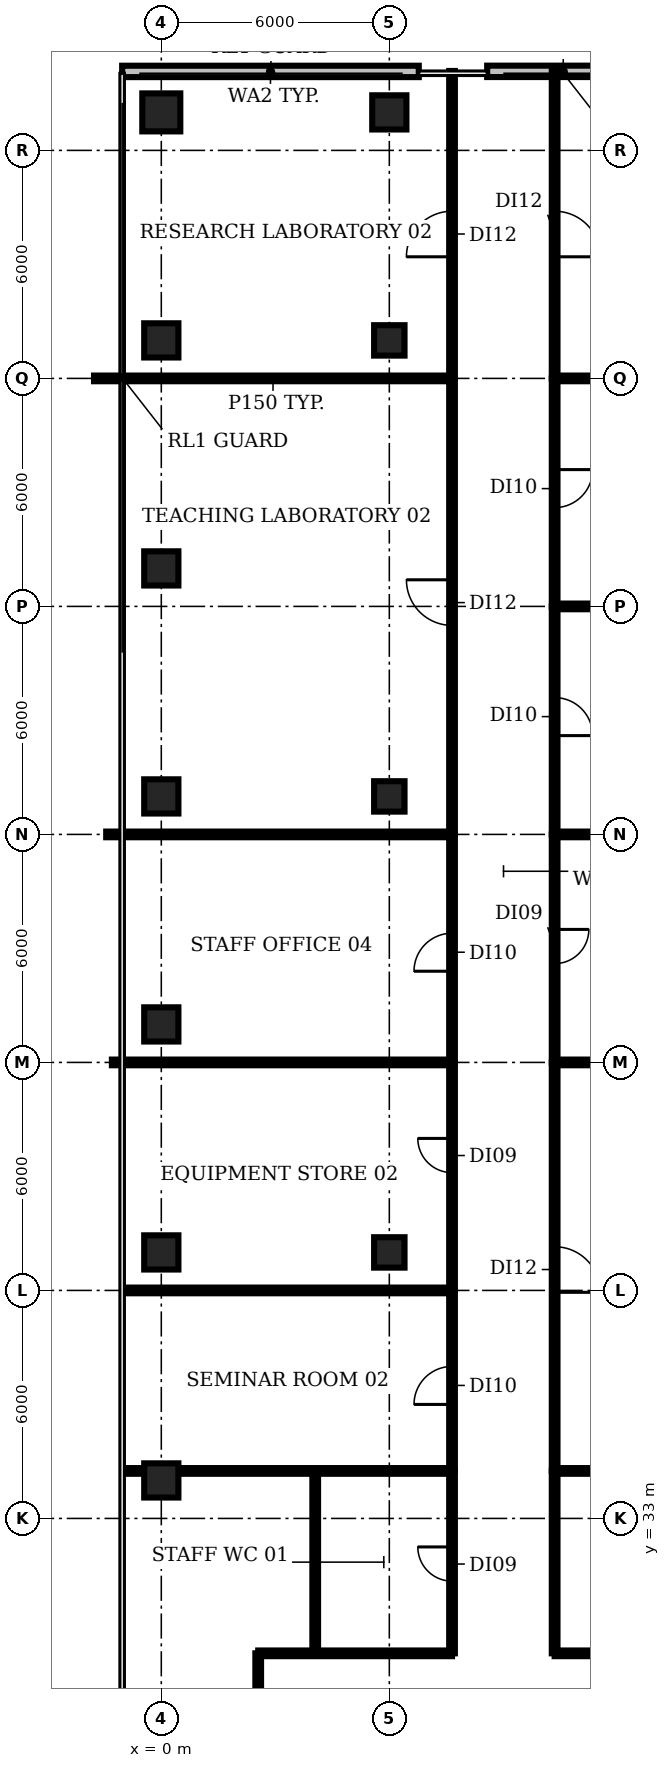
"""IFC4 building model, lengths in metres.
Left out: names, types, materials, properties, quantities, classifications, styles, units other than length and angle.
Written with IfcOpenShell. Run it as: python <this file> out.ifc"""

import sys

from ifc_helpers import new_model, si_unit, direction, frame, frame_2d, origin, origin_2d, place, context, subcontext, project, spatial, rectangle, circle, extrude, element, fill, save


model = new_model("IFC4")
c1 = context("Model", 3, precision=1e-05, world=origin(), true_north=direction((0.0, 1.0)))
c2 = subcontext(c1, "Body", "Model", "MODEL_VIEW")
j1 = project(units=[si_unit("LENGTHUNIT", "METRE"), si_unit("PLANEANGLEUNIT", "RADIAN")], contexts=[c1])
p1 = place(None, origin())
s1 = spatial("IfcSite", under=j1, at=p1, CompositionType="ELEMENT")
p2 = place(p1, origin())
s2 = spatial("IfcBuilding", under=s1, at=p2, CompositionType="ELEMENT")
p3 = place(p2, frame((0.0, 0.0, 104.6)))
s3 = spatial("IfcBuildingStorey", under=s2, at=p3, CompositionType="ELEMENT", Elevation=104.6)
for number, where, z_axis, x_axis in (
    (1, (0.0, 34.0, 0.0), (0.0, 0.0, 1.0), (1.0, 0.0, 0.0)),
    (2, (0.0, 40.0, 0.0), (0.0, 0.0, 1.0), (1.0, 0.0, 0.0)),
    (3, (0.0, 46.0, 0.0), (0.0, 0.0, 1.0), (1.0, 0.0, 0.0)),
    (4, (0.0, 52.0, 0.0), (0.0, 0.0, 1.0), (1.0, 0.0, 0.0)),
    (5, (0.0, 58.0, 0.0), (0.0, 0.0, 1.0), (1.0, 0.0, 0.0)),
    (6, (0.0, 64.0, 0.0), (0.0, 0.0, 1.0), (1.0, 0.0, 0.0)),
):
    element("IfcColumn", number, at=place(p3, frame(where, z_axis=z_axis, x_axis=x_axis)), inside=s3, PredefinedType="COLUMN", context=c2, shape_type="SweptSolid", body=[
        extrude(rectangle(XDim=0.9, YDim=0.9, at=origin_2d()), origin(), (0.0, 0.0, 1.0), 3.85),
    ])
p4 = place(p3, frame((0.0, 70.0, 0.0), z_axis=(0.0, 0.0, 1.0), x_axis=(1.0, 0.0, 0.0)))
e7 = element("IfcColumn", 7, at=p4, inside=s3, PredefinedType="COLUMN", context=c2, shape_type="SweptSolid", body=[
    extrude(circle(Radius=0.5, at=origin_2d()), origin(), (0.0, 0.0, 1.0), 3.85),
])
for number, where, z_axis, x_axis in (
    (8, (6.0, 40.0, 0.0), (0.0, 0.0, 1.0), (1.0, 0.0, 0.0)),
    (9, (6.0, 52.0, 0.0), (0.0, 0.0, 1.0), (1.0, 0.0, 0.0)),
    (10, (6.0, 64.0, 0.0), (0.0, 0.0, 1.0), (1.0, 0.0, 0.0)),
):
    element("IfcColumn", number, at=place(p3, frame(where, z_axis=z_axis, x_axis=x_axis)), inside=s3, PredefinedType="COLUMN", context=c2, shape_type="SweptSolid", body=[
        extrude(rectangle(XDim=0.8, YDim=0.8, at=origin_2d()), origin(), (0.0, 0.0, 1.0), 3.85),
    ])
p5 = place(p3, frame((6.0, 70.0, 0.0), z_axis=(0.0, 0.0, 1.0), x_axis=(1.0, 0.0, 0.0)))
e11 = element("IfcColumn", 11, at=p5, inside=s3, PredefinedType="COLUMN", context=c2, shape_type="SweptSolid", body=[
    extrude(rectangle(XDim=0.9, YDim=0.9, at=origin_2d()), origin(), (0.0, 0.0, 1.0), 3.85),
])
p6 = place(p3, frame((12.578, 71.08, 0.0), z_axis=(0.0, 0.0, 1.0), x_axis=(-1.0, 0.0, 0.0)))
e12 = element("IfcWall", 12, at=p6, inside=s3, PredefinedType="SOLIDWALL", context=c2, shape_type="SweptSolid", body=[
    extrude(rectangle(XDim=4.003, YDim=0.3, at=frame_2d((2.002, 0.0))), origin(), (0.0, 0.0, 1.0), 3.85),
])
p7 = place(p3, frame((6.775, 71.078, 0.0), z_axis=(0.0, 0.0, 1.0), x_axis=(-1.0, 0.0, 0.0)))
e13 = element("IfcWall", 13, at=p7, inside=s3, PredefinedType="SOLIDWALL", context=c2, shape_type="SweptSolid", body=[
    extrude(rectangle(XDim=7.805, YDim=0.3, at=frame_2d((3.902, 0.0))), origin(), (0.0, 0.0, 1.0), 3.85),
])
p8 = place(p3, frame((-1.77, 63.0, 0.0), z_axis=(0.0, 0.0, 1.0), x_axis=(1.0, 0.0, 0.0)))
e14 = element("IfcWall", 14, at=p8, inside=s3, PredefinedType="PARTITIONING", context=c2, shape_type="SweptSolid", body=[
    extrude(rectangle(XDim=9.42, YDim=0.15, at=frame_2d((4.71, 0.0))), origin(), (0.0, 0.0, 1.0), 2.83),
])
p9 = place(p3, frame((-1.45, 51.0, 0.0), z_axis=(0.0, 0.0, 1.0), x_axis=(1.0, 0.0, 0.0)))
e15 = element("IfcWall", 15, at=p9, inside=s3, PredefinedType="PARTITIONING", context=c2, shape_type="SweptSolid", body=[
    extrude(rectangle(XDim=9.1, YDim=0.15, at=frame_2d((4.55, 0.0))), origin(), (0.0, 0.0, 1.0), 2.83),
])
p10 = place(p3, frame((-1.3, 45.0, 0.0), z_axis=(0.0, 0.0, 1.0), x_axis=(1.0, 0.0, 0.0)))
e16 = element("IfcWall", 16, at=p10, inside=s3, PredefinedType="PARTITIONING", context=c2, shape_type="SweptSolid", body=[
    extrude(rectangle(XDim=8.95, YDim=0.15, at=frame_2d((4.475, 0.0))), origin(), (0.0, 0.0, 1.0), 2.83),
])
p11 = place(p3, frame((-0.965, 34.25, 0.0), z_axis=(0.0, 0.0, 1.0), x_axis=(1.0, 0.0, 0.0)))
e17 = element("IfcWall", 17, at=p11, inside=s3, PredefinedType="PARTITIONING", context=c2, shape_type="SweptSolid", body=[
    extrude(rectangle(XDim=8.615, YDim=0.15, at=frame_2d((4.308, 0.0))), origin(), (0.0, 0.0, 1.0), 2.83),
])
p12 = place(p3, frame((-0.97, 39.0, 0.0), z_axis=(0.0, 0.0, 1.0), x_axis=(1.0, 0.0, 0.0)))
e18 = element("IfcWall", 18, at=p12, inside=s3, PredefinedType="PARTITIONING", context=c2, shape_type="SweptSolid", body=[
    extrude(rectangle(XDim=8.62, YDim=0.15, at=frame_2d((4.31, 0.0))), origin(), (0.0, 0.0, 1.0), 2.83),
])
p13 = place(p3, frame((2.55, 25.55, 0.0), z_axis=(0.0, 0.0, 1.0), x_axis=(0.0, 1.0, 0.0)))
e19 = element("IfcWall", 19, at=p13, inside=s3, PredefinedType="PARTITIONING", context=c2, shape_type="SweptSolid", body=[
    extrude(rectangle(XDim=3.9, YDim=0.15, at=frame_2d((1.95, 0.0))), origin(), (0.0, 0.0, 1.0), 2.83),
])
p14 = place(p3, frame((2.55, 29.45, 0.0), z_axis=(0.0, 0.0, 1.0), x_axis=(1.0, 0.0, 0.0)))
e20 = element("IfcWall", 20, at=p14, inside=s3, PredefinedType="PARTITIONING", context=c2, shape_type="SweptSolid", body=[
    extrude(rectangle(XDim=5.1, YDim=0.15, at=frame_2d((2.55, 0.0))), origin(), (0.0, 0.0, 1.0), 2.83),
])
p15 = place(p3, frame((4.05, 29.45, 0.0), z_axis=(0.0, 0.0, 1.0), x_axis=(0.0, 1.0, 0.0)))
e21 = element("IfcWall", 21, at=p15, inside=s3, PredefinedType="PARTITIONING", context=c2, shape_type="SweptSolid", body=[
    extrude(rectangle(XDim=4.8, YDim=0.15, at=frame_2d((2.4, 0.0))), origin(), (0.0, 0.0, 1.0), 2.83),
])
p16 = place(p3, frame((7.65, 29.45, 0.0), z_axis=(0.0, 0.0, 1.0), x_axis=(0.0, 1.0, 0.0)))
e22 = element("IfcWall", 22, at=p16, inside=s3, PredefinedType="PARTITIONING", context=c2, shape_type="SweptSolid", body=[
    extrude(rectangle(XDim=4.8, YDim=0.15, at=frame_2d((2.4, 0.0))), origin(), (0.0, 0.0, 1.0), 2.83),
])
p17 = place(p16, frame((1.9, 0.0, 0.0)))
e23 = element("IfcOpeningElement", 23, at=p17, cuts=e22, PredefinedType="OPENING", context=c2, shape_type="SweptSolid", body=[
    extrude(rectangle(XDim=0.9, YDim=2.1, at=frame_2d((0.45, 1.05))), frame((0.0, 0.085, 0.0), z_axis=(0.0, -1.0, 0.0), x_axis=(1.0, 0.0, 0.0)), (0.0, 0.0, 1.0), 0.17),
])
p18 = place(p3, frame((7.65, 34.25, 0.0), z_axis=(0.0, 0.0, 1.0), x_axis=(0.0, 1.0, 0.0)))
e24 = element("IfcWall", 24, at=p18, inside=s3, PredefinedType="PARTITIONING", context=c2, shape_type="SweptSolid", body=[
    extrude(rectangle(XDim=4.75, YDim=0.15, at=frame_2d((2.375, 0.0))), origin(), (0.0, 0.0, 1.0), 2.83),
])
p19 = place(p18, frame((1.75, 0.0, 0.0)))
e25 = element("IfcOpeningElement", 25, at=p19, cuts=e24, PredefinedType="OPENING", context=c2, shape_type="SweptSolid", body=[
    extrude(rectangle(XDim=1.0, YDim=2.1, at=frame_2d((0.5, 1.05))), frame((0.0, 0.085, 0.0), z_axis=(0.0, -1.0, 0.0), x_axis=(1.0, 0.0, 0.0)), (0.0, 0.0, 1.0), 0.17),
])
p20 = place(p3, frame((7.65, 39.0, 0.0), z_axis=(0.0, 0.0, 1.0), x_axis=(0.0, 1.0, 0.0)))
e26 = element("IfcWall", 26, at=p20, inside=s3, PredefinedType="PARTITIONING", context=c2, shape_type="SweptSolid", body=[
    extrude(rectangle(XDim=6.0, YDim=0.15, at=frame_2d((3.0, 0.0))), origin(), (0.0, 0.0, 1.0), 2.83),
])
p21 = place(p20, frame((3.1, 0.0, 0.0)))
e27 = element("IfcOpeningElement", 27, at=p21, cuts=e26, PredefinedType="OPENING", context=c2, shape_type="SweptSolid", body=[
    extrude(rectangle(XDim=0.9, YDim=2.1, at=frame_2d((0.45, 1.05))), frame((0.0, 0.085, 0.0), z_axis=(0.0, -1.0, 0.0), x_axis=(1.0, 0.0, 0.0)), (0.0, 0.0, 1.0), 0.17),
])
p22 = place(p3, frame((7.65, 45.0, 0.0), z_axis=(0.0, 0.0, 1.0), x_axis=(0.0, 1.0, 0.0)))
e28 = element("IfcWall", 28, at=p22, inside=s3, PredefinedType="PARTITIONING", context=c2, shape_type="SweptSolid", body=[
    extrude(rectangle(XDim=6.0, YDim=0.15, at=frame_2d((3.0, 0.0))), origin(), (0.0, 0.0, 1.0), 2.83),
])
p23 = place(p22, frame((2.4, 0.0, 0.0)))
e29 = element("IfcOpeningElement", 29, at=p23, cuts=e28, PredefinedType="OPENING", context=c2, shape_type="SweptSolid", body=[
    extrude(rectangle(XDim=1.0, YDim=2.1, at=frame_2d((0.5, 1.05))), frame((0.0, 0.085, 0.0), z_axis=(0.0, -1.0, 0.0), x_axis=(1.0, 0.0, 0.0)), (0.0, 0.0, 1.0), 0.17),
])
p24 = place(p3, frame((7.65, 51.0, 0.0), z_axis=(0.0, 0.0, 1.0), x_axis=(0.0, 1.0, 0.0)))
e30 = element("IfcWall", 30, at=p24, inside=s3, PredefinedType="PARTITIONING", context=c2, shape_type="SweptSolid", body=[
    extrude(rectangle(XDim=12.0, YDim=0.15, at=frame_2d((6.0, 0.0))), origin(), (0.0, 0.0, 1.0), 2.83),
])
p25 = place(p24, frame((5.5, 0.0, 0.0)))
e31 = element("IfcOpeningElement", 31, at=p25, cuts=e30, PredefinedType="OPENING", context=c2, shape_type="SweptSolid", body=[
    extrude(rectangle(XDim=1.2, YDim=2.1, at=frame_2d((0.6, 1.05))), frame((0.0, 0.085, 0.0), z_axis=(0.0, -1.0, 0.0), x_axis=(1.0, 0.0, 0.0)), (0.0, 0.0, 1.0), 0.17),
])
p26 = place(p3, frame((7.65, 63.0, 0.0), z_axis=(0.0, 0.0, 1.0), x_axis=(0.0, 1.0, 0.0)))
e32 = element("IfcWall", 32, at=p26, inside=s3, PredefinedType="PARTITIONING", context=c2, shape_type="SweptSolid", body=[
    extrude(rectangle(XDim=8.09, YDim=0.15, at=frame_2d((4.045, 0.0))), origin(), (0.0, 0.0, 1.0), 2.83),
])
p27 = place(p26, frame((3.2, 0.0, 0.0)))
e33 = element("IfcOpeningElement", 33, at=p27, cuts=e32, PredefinedType="OPENING", context=c2, shape_type="SweptSolid", body=[
    extrude(rectangle(XDim=1.2, YDim=2.1, at=frame_2d((0.6, 1.05))), frame((0.0, 0.085, 0.0), z_axis=(0.0, -1.0, 0.0), x_axis=(1.0, 0.0, 0.0)), (0.0, 0.0, 1.0), 0.17),
])
p28 = place(p3, frame((10.35, 29.45, 0.0), z_axis=(0.0, 0.0, 1.0), x_axis=(0.0, 1.0, 0.0)))
e34 = element("IfcWall", 34, at=p28, inside=s3, PredefinedType="PARTITIONING", context=c2, shape_type="SweptSolid", body=[
    extrude(rectangle(XDim=4.8, YDim=0.15, at=frame_2d((2.4, 0.0))), origin(), (0.0, 0.0, 1.0), 2.83),
])
p29 = place(p3, frame((10.35, 29.45, 0.0), z_axis=(0.0, 0.0, 1.0), x_axis=(1.0, 0.0, 0.0)))
e35 = element("IfcWall", 35, at=p29, inside=s3, PredefinedType="PARTITIONING", context=c2, shape_type="SweptSolid", body=[
    extrude(rectangle(XDim=4.05, YDim=0.15, at=frame_2d((2.025, 0.0))), origin(), (0.0, 0.0, 1.0), 2.83),
])
p30 = place(p3, frame((10.35, 34.25, 0.0), z_axis=(0.0, 0.0, 1.0), x_axis=(1.0, 0.0, 0.0)))
e36 = element("IfcWall", 36, at=p30, inside=s3, PredefinedType="PARTITIONING", context=c2, shape_type="SweptSolid", body=[
    extrude(rectangle(XDim=14.82, YDim=0.15, at=frame_2d((7.41, 0.0))), origin(), (0.0, 0.0, 1.0), 2.83),
])
p31 = place(p3, frame((10.35, 45.0, 0.0), z_axis=(0.0, 0.0, 1.0), x_axis=(0.0, -1.0, 0.0)))
e37 = element("IfcWall", 37, at=p31, inside=s3, PredefinedType="PARTITIONING", context=c2, shape_type="SweptSolid", body=[
    extrude(rectangle(XDim=10.75, YDim=0.15, at=frame_2d((5.375, 0.0))), origin(), (0.0, 0.0, 1.0), 2.83),
])
p32 = place(p31, frame((4.85, 0.0, 0.0)))
e38 = element("IfcOpeningElement", 38, at=p32, cuts=e37, PredefinedType="OPENING", context=c2, shape_type="SweptSolid", body=[
    extrude(rectangle(XDim=1.2, YDim=2.1, at=frame_2d((0.6, 1.05))), frame((0.0, 0.085, 0.0), z_axis=(0.0, -1.0, 0.0), x_axis=(1.0, 0.0, 0.0)), (0.0, 0.0, 1.0), 0.17),
])
p33 = place(p3, frame((10.35, 45.0, 0.0), z_axis=(0.0, 0.0, 1.0), x_axis=(1.0, 0.0, 0.0)))
e39 = element("IfcWall", 39, at=p33, inside=s3, PredefinedType="PARTITIONING", context=c2, shape_type="SweptSolid", body=[
    extrude(rectangle(XDim=14.63, YDim=0.15, at=frame_2d((7.315, 0.0))), origin(), (0.0, 0.0, 1.0), 2.83),
])
p34 = place(p3, frame((10.35, 51.0, 0.0), z_axis=(0.0, 0.0, 1.0), x_axis=(0.0, -1.0, 0.0)))
e40 = element("IfcWall", 40, at=p34, inside=s3, PredefinedType="PARTITIONING", context=c2, shape_type="SweptSolid", body=[
    extrude(rectangle(XDim=6.0, YDim=0.15, at=frame_2d((3.0, 0.0))), origin(), (0.0, 0.0, 1.0), 2.83),
])
p35 = place(p34, frame((2.5, 0.0, 0.0)))
e41 = element("IfcOpeningElement", 41, at=p35, cuts=e40, PredefinedType="OPENING", context=c2, shape_type="SweptSolid", body=[
    extrude(rectangle(XDim=0.9, YDim=2.1, at=frame_2d((0.45, 1.05))), frame((0.0, 0.085, 0.0), z_axis=(0.0, -1.0, 0.0), x_axis=(1.0, 0.0, 0.0)), (0.0, 0.0, 1.0), 0.17),
])
p36 = place(p3, frame((10.35, 51.0, 0.0), z_axis=(0.0, 0.0, 1.0), x_axis=(1.0, 0.0, 0.0)))
e42 = element("IfcWall", 42, at=p36, inside=s3, PredefinedType="PARTITIONING", context=c2, shape_type="SweptSolid", body=[
    extrude(rectangle(XDim=14.63, YDim=0.15, at=frame_2d((7.315, 0.0))), origin(), (0.0, 0.0, 1.0), 2.83),
])
p37 = place(p3, frame((10.35, 57.0, 0.0), z_axis=(0.0, 0.0, 1.0), x_axis=(0.0, -1.0, 0.0)))
e43 = element("IfcWall", 43, at=p37, inside=s3, PredefinedType="PARTITIONING", context=c2, shape_type="SweptSolid", body=[
    extrude(rectangle(XDim=6.0, YDim=0.15, at=frame_2d((3.0, 0.0))), origin(), (0.0, 0.0, 1.0), 2.83),
])
p38 = place(p37, frame((2.4, 0.0, 0.0)))
e44 = element("IfcOpeningElement", 44, at=p38, cuts=e43, PredefinedType="OPENING", context=c2, shape_type="SweptSolid", body=[
    extrude(rectangle(XDim=1.0, YDim=2.1, at=frame_2d((0.5, 1.05))), frame((0.0, 0.085, 0.0), z_axis=(0.0, -1.0, 0.0), x_axis=(1.0, 0.0, 0.0)), (0.0, 0.0, 1.0), 0.17),
])
p39 = place(p3, frame((10.35, 57.0, 0.0), z_axis=(0.0, 0.0, 1.0), x_axis=(1.0, 0.0, 0.0)))
e45 = element("IfcWall", 45, at=p39, inside=s3, PredefinedType="PARTITIONING", context=c2, shape_type="SweptSolid", body=[
    extrude(rectangle(XDim=14.63, YDim=0.15, at=frame_2d((7.315, 0.0))), origin(), (0.0, 0.0, 1.0), 2.83),
])
p40 = place(p3, frame((10.35, 63.0, 0.0), z_axis=(0.0, 0.0, 1.0), x_axis=(0.0, -1.0, 0.0)))
e46 = element("IfcWall", 46, at=p40, inside=s3, PredefinedType="PARTITIONING", context=c2, shape_type="SweptSolid", body=[
    extrude(rectangle(XDim=6.0, YDim=0.15, at=frame_2d((3.0, 0.0))), origin(), (0.0, 0.0, 1.0), 2.83),
])
p41 = place(p40, frame((2.4, 0.0, 0.0)))
e47 = element("IfcOpeningElement", 47, at=p41, cuts=e46, PredefinedType="OPENING", context=c2, shape_type="SweptSolid", body=[
    extrude(rectangle(XDim=1.0, YDim=2.1, at=frame_2d((0.5, 1.05))), frame((0.0, 0.085, 0.0), z_axis=(0.0, -1.0, 0.0), x_axis=(1.0, 0.0, 0.0)), (0.0, 0.0, 1.0), 0.17),
])
p42 = place(p3, frame((10.35, 63.0, 0.0), z_axis=(0.0, 0.0, 1.0), x_axis=(1.0, 0.0, 0.0)))
e48 = element("IfcWall", 48, at=p42, inside=s3, PredefinedType="PARTITIONING", context=c2, shape_type="SweptSolid", body=[
    extrude(rectangle(XDim=14.63, YDim=0.15, at=frame_2d((7.315, 0.0))), origin(), (0.0, 0.0, 1.0), 2.83),
])
p43 = place(p3, frame((10.35, 71.09, 0.0), z_axis=(0.0, 0.0, 1.0), x_axis=(0.0, -1.0, 0.0)))
e49 = element("IfcWall", 49, at=p43, inside=s3, PredefinedType="PARTITIONING", context=c2, shape_type="SweptSolid", body=[
    extrude(rectangle(XDim=8.09, YDim=0.15, at=frame_2d((4.045, 0.0))), origin(), (0.0, 0.0, 1.0), 2.83),
])
p44 = place(p43, frame((3.69, 0.0, 0.0)))
e50 = element("IfcOpeningElement", 50, at=p44, cuts=e49, PredefinedType="OPENING", context=c2, shape_type="SweptSolid", body=[
    extrude(rectangle(XDim=1.2, YDim=2.1, at=frame_2d((0.6, 1.05))), frame((0.0, 0.085, 0.0), z_axis=(0.0, -1.0, 0.0), x_axis=(1.0, 0.0, 0.0)), (0.0, 0.0, 1.0), 0.17),
])
p45 = place(p17, origin())
e51 = element("IfcDoor", 51, at=p45, inside=s3, OperationType="SINGLE_SWING_RIGHT", PredefinedType="DOOR", context=c2, shape_type="SweptSolid", body=[
    extrude(rectangle(XDim=0.9, YDim=2.1, at=frame_2d((0.45, 1.05))), frame((0.0, 0.025, 0.0), z_axis=(0.0, -1.0, 0.0), x_axis=(1.0, 0.0, 0.0)), (0.0, 0.0, 1.0), 0.05),
])
fill(e23, e51)
p46 = place(p19, origin())
e52 = element("IfcDoor", 52, at=p46, inside=s3, OperationType="SINGLE_SWING_LEFT", PredefinedType="DOOR", context=c2, shape_type="SweptSolid", body=[
    extrude(rectangle(XDim=1.0, YDim=2.1, at=frame_2d((0.5, 1.05))), frame((0.0, 0.025, 0.0), z_axis=(0.0, -1.0, 0.0), x_axis=(1.0, 0.0, 0.0)), (0.0, 0.0, 1.0), 0.05),
])
fill(e25, e52)
p47 = place(p21, origin())
e53 = element("IfcDoor", 53, at=p47, inside=s3, OperationType="SINGLE_SWING_RIGHT", PredefinedType="DOOR", context=c2, shape_type="SweptSolid", body=[
    extrude(rectangle(XDim=0.9, YDim=2.1, at=frame_2d((0.45, 1.05))), frame((0.0, 0.025, 0.0), z_axis=(0.0, -1.0, 0.0), x_axis=(1.0, 0.0, 0.0)), (0.0, 0.0, 1.0), 0.05),
])
fill(e27, e53)
p48 = place(p23, origin())
e54 = element("IfcDoor", 54, at=p48, inside=s3, OperationType="SINGLE_SWING_LEFT", PredefinedType="DOOR", context=c2, shape_type="SweptSolid", body=[
    extrude(rectangle(XDim=1.0, YDim=2.1, at=frame_2d((0.5, 1.05))), frame((0.0, 0.025, 0.0), z_axis=(0.0, -1.0, 0.0), x_axis=(1.0, 0.0, 0.0)), (0.0, 0.0, 1.0), 0.05),
])
fill(e29, e54)
p49 = place(p25, origin())
e55 = element("IfcDoor", 55, at=p49, inside=s3, OperationType="SINGLE_SWING_RIGHT", PredefinedType="DOOR", context=c2, shape_type="SweptSolid", body=[
    extrude(rectangle(XDim=1.2, YDim=2.1, at=frame_2d((0.6, 1.05))), frame((0.0, 0.025, 0.0), z_axis=(0.0, -1.0, 0.0), x_axis=(1.0, 0.0, 0.0)), (0.0, 0.0, 1.0), 0.05),
])
fill(e31, e55)
p50 = place(p27, origin())
e56 = element("IfcDoor", 56, at=p50, inside=s3, OperationType="SINGLE_SWING_LEFT", PredefinedType="DOOR", context=c2, shape_type="SweptSolid", body=[
    extrude(rectangle(XDim=1.2, YDim=2.1, at=frame_2d((0.6, 1.05))), frame((0.0, 0.025, 0.0), z_axis=(0.0, -1.0, 0.0), x_axis=(1.0, 0.0, 0.0)), (0.0, 0.0, 1.0), 0.05),
])
fill(e33, e56)
p51 = place(p32, origin())
e57 = element("IfcDoor", 57, at=p51, inside=s3, OperationType="SINGLE_SWING_RIGHT", PredefinedType="DOOR", context=c2, shape_type="SweptSolid", body=[
    extrude(rectangle(XDim=1.2, YDim=2.1, at=frame_2d((0.6, 1.05))), frame((0.0, 0.025, 0.0), z_axis=(0.0, -1.0, 0.0), x_axis=(1.0, 0.0, 0.0)), (0.0, 0.0, 1.0), 0.05),
])
fill(e38, e57)
p52 = place(p35, origin())
e58 = element("IfcDoor", 58, at=p52, inside=s3, OperationType="SINGLE_SWING_LEFT", PredefinedType="DOOR", context=c2, shape_type="SweptSolid", body=[
    extrude(rectangle(XDim=0.9, YDim=2.1, at=frame_2d((0.45, 1.05))), frame((0.0, 0.025, 0.0), z_axis=(0.0, -1.0, 0.0), x_axis=(1.0, 0.0, 0.0)), (0.0, 0.0, 1.0), 0.05),
])
fill(e41, e58)
p53 = place(p38, origin())
e59 = element("IfcDoor", 59, at=p53, inside=s3, OperationType="SINGLE_SWING_RIGHT", PredefinedType="DOOR", context=c2, shape_type="SweptSolid", body=[
    extrude(rectangle(XDim=1.0, YDim=2.1, at=frame_2d((0.5, 1.05))), frame((0.0, 0.025, 0.0), z_axis=(0.0, -1.0, 0.0), x_axis=(1.0, 0.0, 0.0)), (0.0, 0.0, 1.0), 0.05),
])
fill(e44, e59)
p54 = place(p41, origin())
e60 = element("IfcDoor", 60, at=p54, inside=s3, OperationType="SINGLE_SWING_LEFT", PredefinedType="DOOR", context=c2, shape_type="SweptSolid", body=[
    extrude(rectangle(XDim=1.0, YDim=2.1, at=frame_2d((0.5, 1.05))), frame((0.0, 0.025, 0.0), z_axis=(0.0, -1.0, 0.0), x_axis=(1.0, 0.0, 0.0)), (0.0, 0.0, 1.0), 0.05),
])
fill(e47, e60)
p55 = place(p44, origin())
e61 = element("IfcDoor", 61, at=p55, inside=s3, OperationType="SINGLE_SWING_RIGHT", PredefinedType="DOOR", context=c2, shape_type="SweptSolid", body=[
    extrude(rectangle(XDim=1.2, YDim=2.1, at=frame_2d((0.6, 1.05))), frame((0.0, 0.025, 0.0), z_axis=(0.0, -1.0, 0.0), x_axis=(1.0, 0.0, 0.0)), (0.0, 0.0, 1.0), 0.05),
])
fill(e50, e61)
save(model, sys.argv[1])
